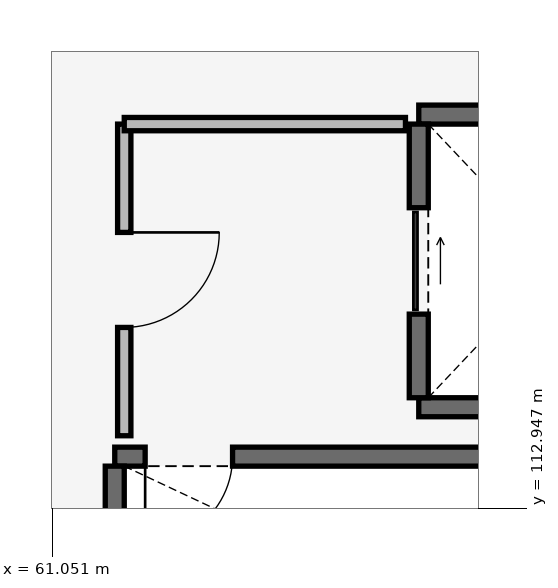
"""IFC4 building model, lengths in metres.
Left out: names, types, materials, properties, quantities, classifications, styles, units other than length and angle.
Written with IfcOpenShell. Run it as: python <this file> out.ifc"""

import sys

from ifc_helpers import new_model, si_unit, direction, frame, frame_2d, origin, place, context, subcontext, project, spatial, rectangle, extrude, element, fill, save


model = new_model("IFC4")
c1 = context("Model", 3, precision=1e-05, world=origin(), true_north=direction((0.0, 1.0)))
c2 = subcontext(c1, "Body", "Model", "MODEL_VIEW")
j1 = project(units=[si_unit("LENGTHUNIT", "METRE"), si_unit("PLANEANGLEUNIT", "RADIAN")], contexts=[c1])
p1 = place(None, origin())
s1 = spatial("IfcSite", under=j1, at=p1, CompositionType="ELEMENT")
p2 = place(p1, origin())
s2 = spatial("IfcBuilding", under=s1, at=p2, CompositionType="ELEMENT")
p3 = place(p2, frame((0.0, 0.0, 5.4)))
s3 = spatial("IfcBuildingStorey", under=s2, at=p3, CompositionType="ELEMENT", Elevation=5.4)
p4 = place(p3, frame((61.875, 113.625, 0.0), z_axis=(0.0, 0.0, 1.0), x_axis=(1.0, 0.0, 0.0)))
e1 = element("IfcWall", 1, at=p4, inside=s3, PredefinedType="SHEAR", context=c2, shape_type="SweptSolid", body=[
    extrude(rectangle(XDim=7.27, YDim=0.25, at=frame_2d((3.635, 0.0))), origin(), (0.0, 0.0, 1.0), 4.52),
])
p5 = place(p4, frame((0.4, 0.0, 0.0)))
e2 = element("IfcOpeningElement", 2, at=p5, cuts=e1, PredefinedType="OPENING", context=c2, shape_type="SweptSolid", body=[
    extrude(rectangle(XDim=1.15, YDim=2.15, at=frame_2d((0.575, 1.075))), frame((0.0, 0.14, 0.0), z_axis=(0.0, -1.0, 0.0), x_axis=(1.0, 0.0, 0.0)), (0.0, 0.0, 1.0), 0.28),
])
p6 = place(p3, frame((61.875, 110.2, 0.0), z_axis=(0.0, 0.0, 1.0), x_axis=(0.0, 1.0, 0.0)))
e3 = element("IfcWall", 3, at=p6, inside=s3, PredefinedType="SHEAR", context=c2, shape_type="SweptSolid", body=[
    extrude(rectangle(XDim=3.3, YDim=0.25, at=frame_2d((1.65, 0.0))), origin(), (0.0, 0.0, 1.0), 4.52),
])
for number, where, z_axis, x_axis in (
    (4, (65.875, 114.275, 0.0), (0.0, 0.0, 1.0), (1.0, 0.0, 0.0)),
    (5, (65.875, 118.125, 0.0), (0.0, 0.0, 1.0), (1.0, 0.0, 0.0)),
):
    element("IfcWall", number, at=place(p3, frame(where, z_axis=z_axis, x_axis=x_axis)), inside=s3, PredefinedType="SHEAR", context=c2, shape_type="SweptSolid", body=[
        extrude(rectangle(XDim=3.65, YDim=0.25, at=frame_2d((1.825, 0.0))), origin(), (0.0, 0.0, 1.0), 4.52),
    ])
p7 = place(p3, frame((65.875, 114.4, 0.0), z_axis=(0.0, 0.0, 1.0), x_axis=(0.0, 1.0, 0.0)))
e6 = element("IfcWall", 6, at=p7, inside=s3, PredefinedType="SHEAR", context=c2, shape_type="SweptSolid", body=[
    extrude(rectangle(XDim=3.6, YDim=0.25, at=frame_2d((1.8, 0.0))), origin(), (0.0, 0.0, 1.0), 4.52),
])
p8 = place(p7, frame((1.1, 0.0, 0.0)))
e7 = element("IfcOpeningElement", 7, at=p8, cuts=e6, PredefinedType="OPENING", context=c2, shape_type="SweptSolid", body=[
    extrude(rectangle(XDim=1.4, YDim=2.2, at=frame_2d((0.7, 1.1))), frame((0.0, 0.14, 0.0), z_axis=(0.0, -1.0, 0.0), x_axis=(1.0, 0.0, 0.0)), (0.0, 0.0, 1.0), 0.28),
])
p9 = place(p3, frame((62.0, 113.9, 0.0), z_axis=(0.0, 0.0, 1.0), x_axis=(0.0, 1.0, 0.0)))
e8 = element("IfcWall", 8, at=p9, inside=s3, PredefinedType="PARTITIONING", context=c2, shape_type="SweptSolid", body=[
    extrude(rectangle(XDim=4.1, YDim=0.175, at=frame_2d((2.05, 0.0))), origin(), (0.0, 0.0, 1.0), 4.52),
])
p10 = place(p9, frame((1.425, 0.0, 0.0)))
e9 = element("IfcOpeningElement", 9, at=p10, cuts=e8, PredefinedType="OPENING", context=c2, shape_type="SweptSolid", body=[
    extrude(rectangle(XDim=1.25, YDim=2.2, at=frame_2d((0.625, 1.1))), frame((0.0, 0.103, 0.0), z_axis=(0.0, -1.0, 0.0), x_axis=(1.0, 0.0, 0.0)), (0.0, 0.0, 1.0), 0.205),
])
p11 = place(p3, frame((62.0, 118.0, 0.0), z_axis=(0.0, 0.0, 1.0), x_axis=(1.0, 0.0, 0.0)))
e10 = element("IfcWall", 10, at=p11, inside=s3, PredefinedType="PARTITIONING", context=c2, shape_type="SweptSolid", body=[
    extrude(rectangle(XDim=3.7, YDim=0.175, at=frame_2d((1.85, 0.0))), origin(), (0.0, 0.0, 1.0), 4.52),
])
p12 = place(p5, frame((1.15, 0.0, 0.0), z_axis=(0.0, 0.0, 1.0), x_axis=(-1.0, 0.0, 0.0)))
e11 = element("IfcDoor", 11, at=p12, inside=s3, OperationType="SINGLE_SWING_LEFT", PredefinedType="DOOR", context=c2, shape_type="SweptSolid", body=[
    extrude(rectangle(XDim=1.15, YDim=2.15, at=frame_2d((0.575, 1.075))), frame((0.0, 0.025, 0.0), z_axis=(0.0, -1.0, 0.0), x_axis=(1.0, 0.0, 0.0)), (0.0, 0.0, 1.0), 0.05),
])
fill(e2, e11)
p13 = place(p8, origin())
e12 = element("IfcDoor", 12, at=p13, inside=s3, OperationType="SLIDING_TO_RIGHT", PredefinedType="DOOR", context=c2, shape_type="SweptSolid", body=[
    extrude(rectangle(XDim=1.4, YDim=2.2, at=frame_2d((0.7, 1.1))), frame((0.0, 0.025, 0.0), z_axis=(0.0, -1.0, 0.0), x_axis=(1.0, 0.0, 0.0)), (0.0, 0.0, 1.0), 0.05),
])
fill(e7, e12)
p14 = place(p10, frame((1.25, 0.0, 0.0), z_axis=(0.0, 0.0, 1.0), x_axis=(-1.0, 0.0, 0.0)))
e13 = element("IfcDoor", 13, at=p14, inside=s3, OperationType="SINGLE_SWING_RIGHT", PredefinedType="DOOR", context=c2, shape_type="SweptSolid", body=[
    extrude(rectangle(XDim=1.25, YDim=2.2, at=frame_2d((0.625, 1.1))), frame((0.0, 0.025, 0.0), z_axis=(0.0, -1.0, 0.0), x_axis=(1.0, 0.0, 0.0)), (0.0, 0.0, 1.0), 0.05),
])
fill(e9, e13)
save(model, sys.argv[1])
